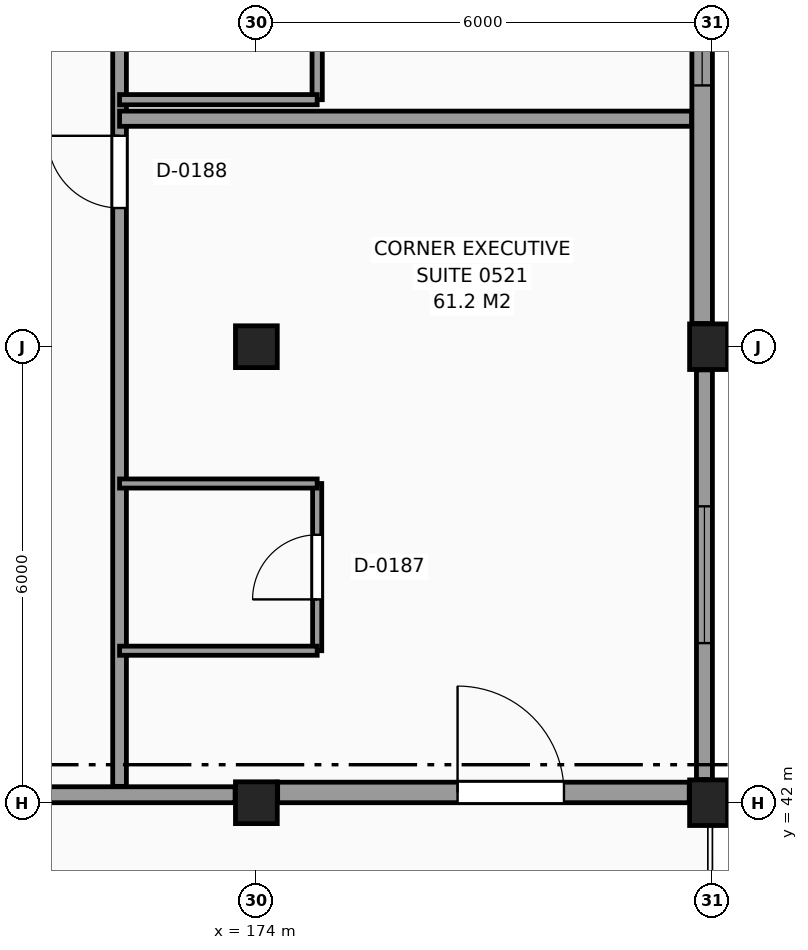
"""IFC4 building model, lengths in metres.
Left out: names, types, materials, properties, quantities, classifications, styles, units other than length and angle.
Written with IfcOpenShell. Run it as: python <this file> out.ifc"""

import sys

from ifc_helpers import new_model, si_unit, direction, frame, frame_2d, origin, origin_2d, place, context, subcontext, project, spatial, rectangle, extrude, element, fill, save


model = new_model("IFC4")
c1 = context("Model", 3, precision=1e-05, world=origin(), true_north=direction((0.0, 1.0)))
c2 = subcontext(c1, "Body", "Model", "MODEL_VIEW")
j1 = project(units=[si_unit("LENGTHUNIT", "METRE"), si_unit("PLANEANGLEUNIT", "RADIAN")], contexts=[c1])
p1 = place(None, origin())
s1 = spatial("IfcSite", under=j1, at=p1, CompositionType="ELEMENT")
p2 = place(p1, origin())
s2 = spatial("IfcBuilding", under=s1, at=p2, CompositionType="ELEMENT")
p3 = place(p2, frame((0.0, 0.0, 24.6)))
s3 = spatial("IfcBuildingStorey", under=s2, at=p3, CompositionType="ELEMENT", Elevation=24.6)
for number, where, z_axis, x_axis in (
    (1, (174.0, 42.0, 0.0), (0.0, 0.0, 1.0), (1.0, 0.0, 0.0)),
    (2, (174.0, 48.0, 0.0), (0.0, 0.0, 1.0), (1.0, 0.0, 0.0)),
):
    element("IfcColumn", number, at=place(p3, frame(where, z_axis=z_axis, x_axis=x_axis)), inside=s3, PredefinedType="COLUMN", context=c2, shape_type="SweptSolid", body=[
        extrude(rectangle(XDim=0.55, YDim=0.55, at=origin_2d()), origin(), (0.0, 0.0, 1.0), 3.6),
    ])
for number, where, z_axis, x_axis in (
    (3, (180.0, 42.0, 0.0), (0.0, 0.0, 1.0), (1.0, 0.0, 0.0)),
    (4, (180.0, 48.0, 0.0), (0.0, 0.0, 1.0), (1.0, 0.0, 0.0)),
):
    element("IfcColumn", number, at=place(p3, frame(where, z_axis=z_axis, x_axis=x_axis)), inside=s3, PredefinedType="COLUMN", context=c2, shape_type="SweptSolid", body=[
        extrude(rectangle(XDim=0.6, YDim=0.6, at=origin_2d()), origin(), (0.0, 0.0, 1.0), 3.6),
    ])
p4 = place(p3, frame((179.895, 42.305, 0.0), z_axis=(0.0, 0.0, 1.0), x_axis=(0.0, 1.0, 0.0)))
e5 = element("IfcWall", 5, at=p4, inside=s3, PredefinedType="SOLIDWALL", context=c2, shape_type="SweptSolid", body=[
    extrude(rectangle(XDim=5.39, YDim=0.21, at=frame_2d((2.695, 0.0))), origin(), (0.0, 0.0, 1.0), 2.73),
])
p5 = place(p4, frame((1.795, 0.0, 0.8)))
e6 = element("IfcOpeningElement", 6, at=p5, cuts=e5, PredefinedType="OPENING", context=c2, shape_type="SweptSolid", body=[
    extrude(rectangle(XDim=1.8, YDim=1.7, at=frame_2d((0.9, 0.85))), frame((0.0, 0.115, 0.0), z_axis=(0.0, -1.0, 0.0), x_axis=(1.0, 0.0, 0.0)), (0.0, 0.0, 1.0), 0.23),
])
p6 = place(p3, frame((179.865, 48.305, 0.0), z_axis=(0.0, 0.0, 1.0), x_axis=(0.0, 1.0, 0.0)))
e7 = element("IfcWall", 7, at=p6, inside=s3, PredefinedType="SOLIDWALL", context=c2, shape_type="SweptSolid", body=[
    extrude(rectangle(XDim=5.39, YDim=0.27, at=frame_2d((2.695, 0.0))), origin(), (0.0, 0.0, 1.0), 2.73),
])
p7 = place(p6, frame((3.133, 0.0, 0.8)))
e8 = element("IfcOpeningElement", 8, at=p7, cuts=e7, PredefinedType="OPENING", context=c2, shape_type="SweptSolid", body=[
    extrude(rectangle(XDim=1.8, YDim=1.7, at=frame_2d((0.9, 0.85))), frame((0.0, 0.145, 0.0), z_axis=(0.0, -1.0, 0.0), x_axis=(1.0, 0.0, 0.0)), (0.0, 0.0, 1.0), 0.29),
])
p8 = place(p3, frame((168.305, 42.105, 0.0), z_axis=(0.0, 0.0, 1.0), x_axis=(1.0, 0.0, 0.0)))
e9 = element("IfcWall", 9, at=p8, inside=s3, PredefinedType="SOLIDWALL", context=c2, shape_type="SweptSolid", body=[
    extrude(rectangle(XDim=5.415, YDim=0.21, at=frame_2d((2.708, 0.0))), origin(), (0.0, 0.0, 1.0), 2.58),
])
p9 = place(p3, frame((174.28, 42.135, 0.0), z_axis=(0.0, 0.0, 1.0), x_axis=(1.0, 0.0, 0.0)))
e10 = element("IfcWall", 10, at=p9, inside=s3, PredefinedType="SOLIDWALL", context=c2, shape_type="SweptSolid", body=[
    extrude(rectangle(XDim=5.415, YDim=0.27, at=frame_2d((2.708, 0.0))), origin(), (0.0, 0.0, 1.0), 2.58),
])
p10 = place(p9, frame((2.367, 0.0, 0.0)))
e11 = element("IfcOpeningElement", 11, at=p10, cuts=e10, PredefinedType="OPENING", context=c2, shape_type="SweptSolid", body=[
    extrude(rectangle(XDim=1.4, YDim=2.1, at=frame_2d((0.7, 1.05))), frame((0.0, 0.145, 0.0), z_axis=(0.0, -1.0, 0.0), x_axis=(1.0, 0.0, 0.0)), (0.0, 0.0, 1.0), 0.29),
])
p11 = place(p3, frame((172.2, 42.215, 0.0), z_axis=(0.0, 0.0, 1.0), x_axis=(0.0, 1.0, 0.0)))
e12 = element("IfcWall", 12, at=p11, inside=s3, PredefinedType="PARTITIONING", context=c2, shape_type="SweptSolid", body=[
    extrude(rectangle(XDim=65.605, YDim=0.18, at=frame_2d((32.802, 0.0))), origin(), (0.0, 0.0, 1.0), 3.38),
])
p12 = place(p11, frame((7.61, 0.0, 0.0)))
e13 = element("IfcOpeningElement", 13, at=p12, cuts=e12, PredefinedType="OPENING", context=c2, shape_type="SweptSolid", body=[
    extrude(rectangle(XDim=0.95, YDim=2.1, at=frame_2d((0.475, 1.05))), frame((0.0, 0.1, 0.0), z_axis=(0.0, -1.0, 0.0), x_axis=(1.0, 0.0, 0.0)), (0.0, 0.0, 1.0), 0.2),
])
p13 = place(p11, frame((12.11, 0.0, 0.0)))
e14 = element("IfcOpeningElement", 14, at=p13, cuts=e12, PredefinedType="OPENING", context=c2, shape_type="SweptSolid", body=[
    extrude(rectangle(XDim=0.95, YDim=2.1, at=frame_2d((0.475, 1.05))), frame((0.0, 0.1, 0.0), z_axis=(0.0, -1.0, 0.0), x_axis=(1.0, 0.0, 0.0)), (0.0, 0.0, 1.0), 0.2),
])
p14 = place(p11, frame((16.31, 0.0, 0.0)))
e15 = element("IfcOpeningElement", 15, at=p14, cuts=e12, PredefinedType="OPENING", context=c2, shape_type="SweptSolid", body=[
    extrude(rectangle(XDim=0.95, YDim=2.1, at=frame_2d((0.475, 1.05))), frame((0.0, 0.1, 0.0), z_axis=(0.0, -1.0, 0.0), x_axis=(1.0, 0.0, 0.0)), (0.0, 0.0, 1.0), 0.2),
])
p15 = place(p11, frame((25.61, 0.0, 0.0)))
e16 = element("IfcOpeningElement", 16, at=p15, cuts=e12, PredefinedType="OPENING", context=c2, shape_type="SweptSolid", body=[
    extrude(rectangle(XDim=0.95, YDim=2.1, at=frame_2d((0.475, 1.05))), frame((0.0, 0.1, 0.0), z_axis=(0.0, -1.0, 0.0), x_axis=(1.0, 0.0, 0.0)), (0.0, 0.0, 1.0), 0.2),
])
p16 = place(p11, frame((30.11, 0.0, 0.0)))
e17 = element("IfcOpeningElement", 17, at=p16, cuts=e12, PredefinedType="OPENING", context=c2, shape_type="SweptSolid", body=[
    extrude(rectangle(XDim=0.95, YDim=2.1, at=frame_2d((0.475, 1.05))), frame((0.0, 0.1, 0.0), z_axis=(0.0, -1.0, 0.0), x_axis=(1.0, 0.0, 0.0)), (0.0, 0.0, 1.0), 0.2),
])
p17 = place(p11, frame((34.31, 0.0, 0.0)))
e18 = element("IfcOpeningElement", 18, at=p17, cuts=e12, PredefinedType="OPENING", context=c2, shape_type="SweptSolid", body=[
    extrude(rectangle(XDim=0.95, YDim=2.1, at=frame_2d((0.475, 1.05))), frame((0.0, 0.1, 0.0), z_axis=(0.0, -1.0, 0.0), x_axis=(1.0, 0.0, 0.0)), (0.0, 0.0, 1.0), 0.2),
])
p18 = place(p11, frame((36.51, 0.0, 0.0)))
e19 = element("IfcOpeningElement", 19, at=p18, cuts=e12, PredefinedType="OPENING", context=c2, shape_type="SweptSolid", body=[
    extrude(rectangle(XDim=0.95, YDim=2.1, at=frame_2d((0.475, 1.05))), frame((0.0, 0.1, 0.0), z_axis=(0.0, -1.0, 0.0), x_axis=(1.0, 0.0, 0.0)), (0.0, 0.0, 1.0), 0.2),
])
p19 = place(p11, frame((42.51, 0.0, 0.0)))
e20 = element("IfcOpeningElement", 20, at=p19, cuts=e12, PredefinedType="OPENING", context=c2, shape_type="SweptSolid", body=[
    extrude(rectangle(XDim=0.95, YDim=2.1, at=frame_2d((0.475, 1.05))), frame((0.0, 0.1, 0.0), z_axis=(0.0, -1.0, 0.0), x_axis=(1.0, 0.0, 0.0)), (0.0, 0.0, 1.0), 0.2),
])
p20 = place(p11, frame((52.31, 0.0, 0.0)))
e21 = element("IfcOpeningElement", 21, at=p20, cuts=e12, PredefinedType="OPENING", context=c2, shape_type="SweptSolid", body=[
    extrude(rectangle(XDim=0.95, YDim=2.1, at=frame_2d((0.475, 1.05))), frame((0.0, 0.1, 0.0), z_axis=(0.0, -1.0, 0.0), x_axis=(1.0, 0.0, 0.0)), (0.0, 0.0, 1.0), 0.2),
])
p21 = place(p11, frame((54.51, 0.0, 0.0)))
e22 = element("IfcOpeningElement", 22, at=p21, cuts=e12, PredefinedType="OPENING", context=c2, shape_type="SweptSolid", body=[
    extrude(rectangle(XDim=0.95, YDim=2.1, at=frame_2d((0.475, 1.05))), frame((0.0, 0.1, 0.0), z_axis=(0.0, -1.0, 0.0), x_axis=(1.0, 0.0, 0.0)), (0.0, 0.0, 1.0), 0.2),
])
p22 = place(p11, frame((60.51, 0.0, 0.0)))
e23 = element("IfcOpeningElement", 23, at=p22, cuts=e12, PredefinedType="OPENING", context=c2, shape_type="SweptSolid", body=[
    extrude(rectangle(XDim=0.95, YDim=2.1, at=frame_2d((0.475, 1.05))), frame((0.0, 0.1, 0.0), z_axis=(0.0, -1.0, 0.0), x_axis=(1.0, 0.0, 0.0)), (0.0, 0.0, 1.0), 0.2),
])
p23 = place(p3, frame((174.8, 44.0, 0.0), z_axis=(0.0, 0.0, 1.0), x_axis=(0.0, 1.0, 0.0)))
e24 = element("IfcWall", 24, at=p23, inside=s3, PredefinedType="PARTITIONING", context=c2, shape_type="SweptSolid", body=[
    extrude(rectangle(XDim=2.2, YDim=0.12, at=frame_2d((1.1, 0.0))), origin(), (0.0, 0.0, 1.0), 3.38),
])
p24 = place(p23, frame((0.675, 0.0, 0.0)))
e25 = element("IfcOpeningElement", 25, at=p24, cuts=e24, PredefinedType="OPENING", context=c2, shape_type="SweptSolid", body=[
    extrude(rectangle(XDim=0.85, YDim=2.1, at=frame_2d((0.425, 1.05))), frame((0.0, 0.07, 0.0), z_axis=(0.0, -1.0, 0.0), x_axis=(1.0, 0.0, 0.0)), (0.0, 0.0, 1.0), 0.14),
])
p25 = place(p3, frame((174.8, 51.25, 0.0), z_axis=(0.0, 0.0, 1.0), x_axis=(0.0, 1.0, 0.0)))
e26 = element("IfcWall", 26, at=p25, inside=s3, PredefinedType="PARTITIONING", context=c2, shape_type="SweptSolid", body=[
    extrude(rectangle(XDim=2.2, YDim=0.135, at=frame_2d((1.1, 0.0))), origin(), (0.0, 0.0, 1.0), 3.38),
])
p26 = place(p25, frame((0.675, 0.0, 0.0)))
e27 = element("IfcOpeningElement", 27, at=p26, cuts=e26, PredefinedType="OPENING", context=c2, shape_type="SweptSolid", body=[
    extrude(rectangle(XDim=0.85, YDim=2.1, at=frame_2d((0.425, 1.05))), frame((0.0, 0.078, 0.0), z_axis=(0.0, -1.0, 0.0), x_axis=(1.0, 0.0, 0.0)), (0.0, 0.0, 1.0), 0.155),
])
for number, where, z_axis, x_axis in (
    (28, (172.2, 44.0, 0.0), (0.0, 0.0, 1.0), (1.0, 0.0, 0.0)),
    (29, (172.2, 46.2, 0.0), (0.0, 0.0, 1.0), (1.0, 0.0, 0.0)),
):
    element("IfcWall", number, at=place(p3, frame(where, z_axis=z_axis, x_axis=x_axis)), inside=s3, PredefinedType="PARTITIONING", context=c2, shape_type="SweptSolid", body=[
        extrude(rectangle(XDim=2.6, YDim=0.12, at=frame_2d((1.3, 0.0))), origin(), (0.0, 0.0, 1.0), 3.38),
    ])
p27 = place(p3, frame((172.2, 51.0, 0.0), z_axis=(0.0, 0.0, 1.0), x_axis=(1.0, 0.0, 0.0)))
e30 = element("IfcWall", 30, at=p27, inside=s3, PredefinedType="PARTITIONING", context=c2, shape_type="SweptSolid", body=[
    extrude(rectangle(XDim=7.525, YDim=0.2, at=frame_2d((3.763, 0.0))), origin(), (0.0, 0.0, 1.0), 3.38),
])
p28 = place(p3, frame((172.2, 51.25, 0.0), z_axis=(0.0, 0.0, 1.0), x_axis=(1.0, 0.0, 0.0)))
e31 = element("IfcWall", 31, at=p28, inside=s3, PredefinedType="PARTITIONING", context=c2, shape_type="SweptSolid", body=[
    extrude(rectangle(XDim=2.6, YDim=0.135, at=frame_2d((1.3, 0.0))), origin(), (0.0, 0.0, 1.0), 3.38),
])
p29 = place(p10, frame((1.4, 0.0, 0.0), z_axis=(0.0, 0.0, 1.0), x_axis=(-1.0, 0.0, 0.0)))
e32 = element("IfcDoor", 32, at=p29, inside=s3, OperationType="SINGLE_SWING_LEFT", PredefinedType="DOOR", context=c2, shape_type="SweptSolid", body=[
    extrude(rectangle(XDim=1.4, YDim=2.1, at=frame_2d((0.7, 1.05))), frame((0.0, 0.025, 0.0), z_axis=(0.0, -1.0, 0.0), x_axis=(1.0, 0.0, 0.0)), (0.0, 0.0, 1.0), 0.05),
])
fill(e11, e32)
p30 = place(p5, origin())
e33 = element("IfcWindow", 33, at=p30, inside=s3, PartitioningType="SINGLE_PANEL", PredefinedType="WINDOW", context=c2, shape_type="SweptSolid", body=[
    extrude(rectangle(XDim=1.8, YDim=1.7, at=frame_2d((0.9, 0.85))), frame((0.0, 0.03, 0.0), z_axis=(0.0, -1.0, 0.0), x_axis=(1.0, 0.0, 0.0)), (0.0, 0.0, 1.0), 0.06),
])
fill(e6, e33)
p31 = place(p7, origin())
e34 = element("IfcWindow", 34, at=p31, inside=s3, PartitioningType="SINGLE_PANEL", PredefinedType="WINDOW", context=c2, shape_type="SweptSolid", body=[
    extrude(rectangle(XDim=1.8, YDim=1.7, at=frame_2d((0.9, 0.85))), frame((0.0, 0.03, 0.0), z_axis=(0.0, -1.0, 0.0), x_axis=(1.0, 0.0, 0.0)), (0.0, 0.0, 1.0), 0.06),
])
fill(e8, e34)
p32 = place(p24, origin())
e35 = element("IfcDoor", 35, at=p32, inside=s3, OperationType="SINGLE_SWING_LEFT", PredefinedType="DOOR", context=c2, shape_type="SweptSolid", body=[
    extrude(rectangle(XDim=0.85, YDim=2.1, at=frame_2d((0.425, 1.05))), frame((0.0, 0.025, 0.0), z_axis=(0.0, -1.0, 0.0), x_axis=(1.0, 0.0, 0.0)), (0.0, 0.0, 1.0), 0.05),
])
fill(e25, e35)
p33 = place(p12, origin())
e36 = element("IfcDoor", 36, at=p33, inside=s3, OperationType="SINGLE_SWING_RIGHT", PredefinedType="DOOR", context=c2, shape_type="SweptSolid", body=[
    extrude(rectangle(XDim=0.95, YDim=2.1, at=frame_2d((0.475, 1.05))), frame((0.0, 0.025, 0.0), z_axis=(0.0, -1.0, 0.0), x_axis=(1.0, 0.0, 0.0)), (0.0, 0.0, 1.0), 0.05),
])
fill(e13, e36)
save(model, sys.argv[1])
